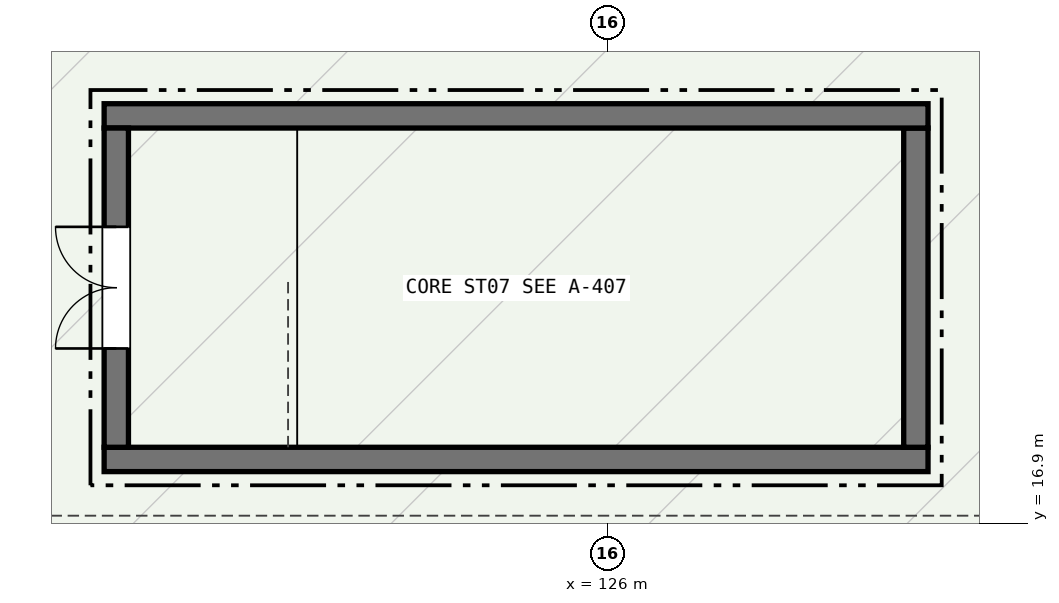
"""IFC4 building model, lengths in metres.
Left out: names, types, materials, properties, quantities, classifications, styles, units other than length and angle.
Written with IfcOpenShell. Run it as: python <this file> out.ifc"""

import sys

from ifc_helpers import new_model, si_unit, direction, frame, frame_2d, origin, place, context, subcontext, project, spatial, rectangle, extrude, element, fill, save


model = new_model("IFC4")
c1 = context("Model", 3, precision=1e-05, world=origin(), true_north=direction((0.0, 1.0)))
c2 = subcontext(c1, "Body", "Model", "MODEL_VIEW")
j1 = project(units=[si_unit("LENGTHUNIT", "METRE"), si_unit("PLANEANGLEUNIT", "RADIAN")], contexts=[c1])
p1 = place(None, origin())
s1 = spatial("IfcSite", under=j1, at=p1, CompositionType="ELEMENT")
p2 = place(p1, origin())
s2 = spatial("IfcBuilding", under=s1, at=p2, CompositionType="ELEMENT")
p3 = place(p2, frame((0.0, 0.0, 26.7)))
s3 = spatial("IfcBuildingStorey", under=s2, at=p3, CompositionType="ELEMENT", Elevation=26.7)
p4 = place(p3, frame((119.38, 17.74, 0.0), z_axis=(0.0, 0.0, 1.0), x_axis=(1.0, 0.0, 0.0)))
e1 = element("IfcWall", 1, at=p4, inside=s3, PredefinedType="SHEAR", context=c2, shape_type="SweptSolid", body=[
    extrude(rectangle(XDim=10.84, YDim=0.32, at=frame_2d((5.42, 0.0))), origin(), (0.0, 0.0, 1.0), 3.2),
])
p5 = place(p3, frame((130.06, 17.9, 0.0), z_axis=(0.0, 0.0, 1.0), x_axis=(0.0, 1.0, 0.0)))
e2 = element("IfcWall", 2, at=p5, inside=s3, PredefinedType="SHEAR", context=c2, shape_type="SweptSolid", body=[
    extrude(rectangle(XDim=4.2, YDim=0.32, at=frame_2d((2.1, 0.0))), origin(), (0.0, 0.0, 1.0), 3.2),
])
p6 = place(p3, frame((130.22, 22.26, 0.0), z_axis=(0.0, 0.0, 1.0), x_axis=(-1.0, 0.0, 0.0)))
e3 = element("IfcWall", 3, at=p6, inside=s3, PredefinedType="SHEAR", context=c2, shape_type="SweptSolid", body=[
    extrude(rectangle(XDim=10.84, YDim=0.32, at=frame_2d((5.42, 0.0))), origin(), (0.0, 0.0, 1.0), 3.2),
])
p7 = place(p3, frame((119.54, 22.1, 0.0), z_axis=(0.0, 0.0, 1.0), x_axis=(0.0, -1.0, 0.0)))
e4 = element("IfcWall", 4, at=p7, inside=s3, PredefinedType="SHEAR", context=c2, shape_type="SweptSolid", body=[
    extrude(rectangle(XDim=4.2, YDim=0.32, at=frame_2d((2.1, 0.0))), origin(), (0.0, 0.0, 1.0), 3.2),
])
p8 = place(p7, frame((1.3, 0.0, 0.0)))
e5 = element("IfcOpeningElement", 5, at=p8, cuts=e4, PredefinedType="OPENING", context=c2, shape_type="SweptSolid", body=[
    extrude(rectangle(XDim=1.6, YDim=2.2, at=frame_2d((0.8, 1.1))), frame((0.0, 0.17, 0.0), z_axis=(0.0, -1.0, 0.0), x_axis=(1.0, 0.0, 0.0)), (0.0, 0.0, 1.0), 0.34),
])
p9 = place(p8, frame((1.6, 0.0, 0.0), z_axis=(0.0, 0.0, 1.0), x_axis=(-1.0, 0.0, 0.0)))
e6 = element("IfcDoor", 6, at=p9, inside=s3, OperationType="DOUBLE_DOOR_SINGLE_SWING", PredefinedType="DOOR", context=c2, shape_type="SweptSolid", body=[
    extrude(rectangle(XDim=1.6, YDim=2.2, at=frame_2d((0.8, 1.1))), frame((0.0, 0.025, 0.0), z_axis=(0.0, -1.0, 0.0), x_axis=(1.0, 0.0, 0.0)), (0.0, 0.0, 1.0), 0.05),
])
fill(e5, e6)
save(model, sys.argv[1])
